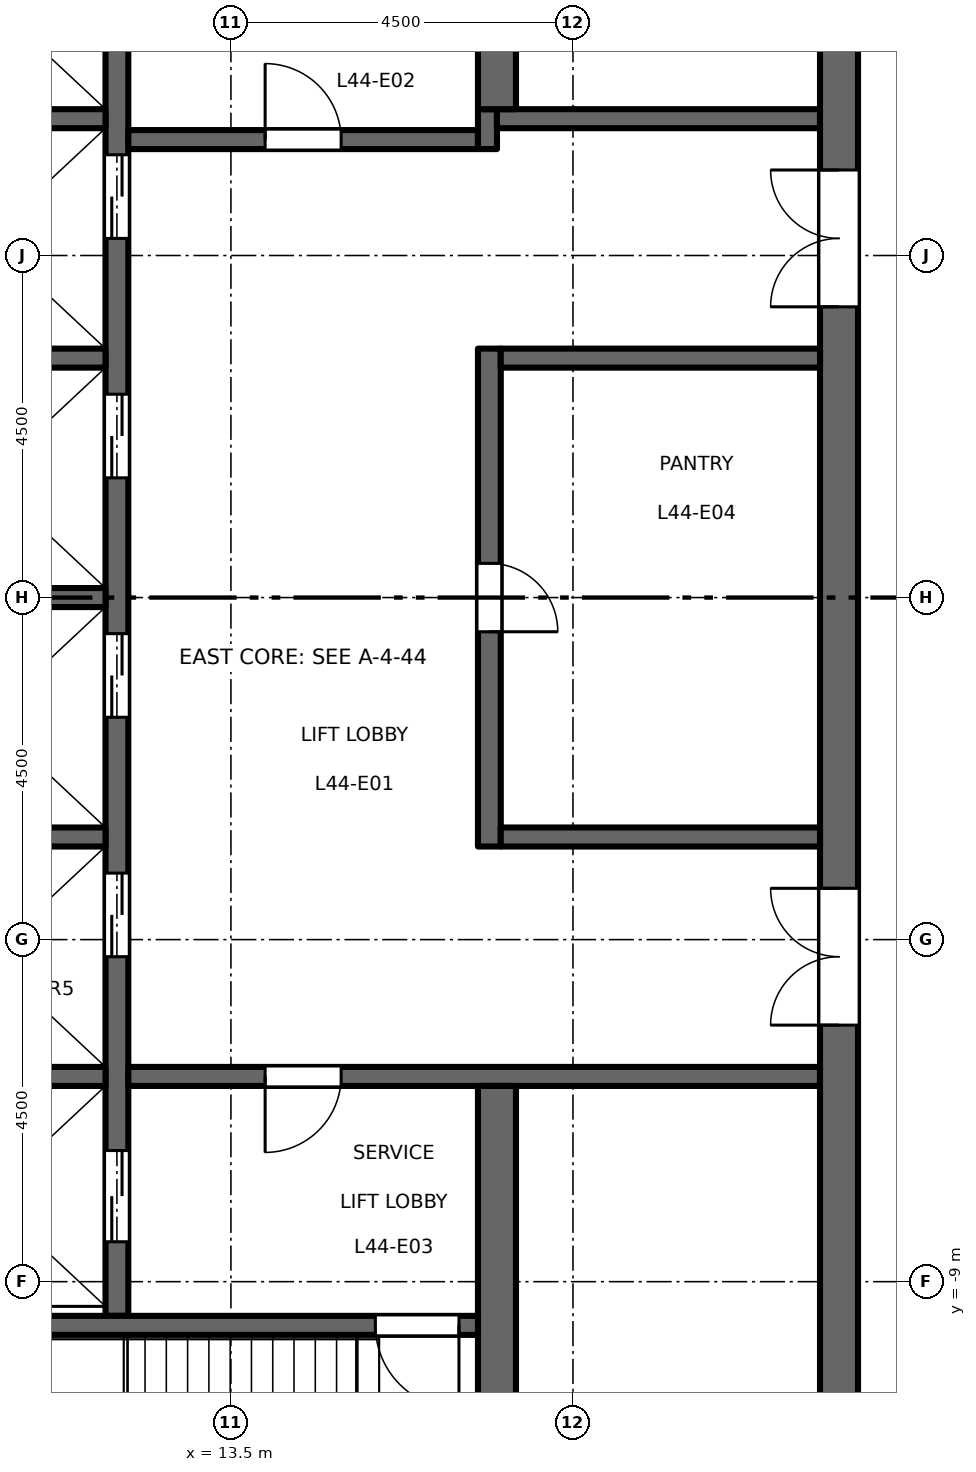
"""IFC4 building model, lengths in metres.
Left out: names, types, materials, properties, quantities, classifications, styles, units other than length and angle.
Written with IfcOpenShell. Run it as: python <this file> out.ifc"""

import sys

from ifc_helpers import new_model, si_unit, direction, frame, frame_2d, origin, place, context, subcontext, project, spatial, rectangle, extrude, element, fill, save


model = new_model("IFC4")
c1 = context("Model", 3, precision=1e-05, world=origin(), true_north=direction((0.0, 1.0)))
c2 = subcontext(c1, "Body", "Model", "MODEL_VIEW")
j1 = project(units=[si_unit("LENGTHUNIT", "METRE"), si_unit("PLANEANGLEUNIT", "RADIAN")], contexts=[c1])
p1 = place(None, origin())
s1 = spatial("IfcSite", under=j1, at=p1, CompositionType="ELEMENT")
p2 = place(p1, origin())
s2 = spatial("IfcBuilding", under=s1, at=p2, CompositionType="ELEMENT")
p3 = place(p2, frame((0.0, 0.0, 206.2)))
s3 = spatial("IfcBuildingStorey", under=s2, at=p3, CompositionType="ELEMENT", Elevation=206.2)
p4 = place(p3, frame((12.0, -9.45, 0.0), z_axis=(0.0, 0.0, 1.0), x_axis=(0.0, 1.0, 0.0)))
e1 = element("IfcWall", 1, at=p4, inside=s3, PredefinedType="SHEAR", context=c2, shape_type="SweptSolid", body=[
    extrude(rectangle(XDim=18.9, YDim=0.3, at=frame_2d((9.45, 0.0))), origin(), (0.0, 0.0, 1.0), 4.35),
])
p5 = place(p4, frame((4.725, 0.0, 0.0)))
e2 = element("IfcOpeningElement", 2, at=p5, cuts=e1, PredefinedType="OPENING", context=c2, shape_type="SweptSolid", body=[
    extrude(rectangle(XDim=1.1, YDim=2.1, at=frame_2d((0.55, 1.05))), frame((0.0, 0.16, 0.0), z_axis=(0.0, -1.0, 0.0), x_axis=(1.0, 0.0, 0.0)), (0.0, 0.0, 1.0), 0.32),
])
p6 = place(p4, frame((7.875, 0.0, 0.0)))
e3 = element("IfcOpeningElement", 3, at=p6, cuts=e1, PredefinedType="OPENING", context=c2, shape_type="SweptSolid", body=[
    extrude(rectangle(XDim=1.1, YDim=2.1, at=frame_2d((0.55, 1.05))), frame((0.0, 0.16, 0.0), z_axis=(0.0, -1.0, 0.0), x_axis=(1.0, 0.0, 0.0)), (0.0, 0.0, 1.0), 0.32),
])
p7 = place(p4, frame((11.025, 0.0, 0.0)))
e4 = element("IfcOpeningElement", 4, at=p7, cuts=e1, PredefinedType="OPENING", context=c2, shape_type="SweptSolid", body=[
    extrude(rectangle(XDim=1.1, YDim=2.1, at=frame_2d((0.55, 1.05))), frame((0.0, 0.16, 0.0), z_axis=(0.0, -1.0, 0.0), x_axis=(1.0, 0.0, 0.0)), (0.0, 0.0, 1.0), 0.32),
])
p8 = place(p4, frame((14.175, 0.0, 0.0)))
e5 = element("IfcOpeningElement", 5, at=p8, cuts=e1, PredefinedType="OPENING", context=c2, shape_type="SweptSolid", body=[
    extrude(rectangle(XDim=1.1, YDim=2.1, at=frame_2d((0.55, 1.05))), frame((0.0, 0.16, 0.0), z_axis=(0.0, -1.0, 0.0), x_axis=(1.0, 0.0, 0.0)), (0.0, 0.0, 1.0), 0.32),
])
p9 = place(p4, frame((16.725, 0.0, 0.0)))
e6 = element("IfcOpeningElement", 6, at=p9, cuts=e1, PredefinedType="OPENING", context=c2, shape_type="SweptSolid", body=[
    extrude(rectangle(XDim=1.2, YDim=2.1, at=frame_2d((0.6, 1.05))), frame((0.0, 0.16, 0.0), z_axis=(0.0, -1.0, 0.0), x_axis=(1.0, 0.0, 0.0)), (0.0, 0.0, 1.0), 0.32),
])
p10 = place(p4, frame((0.975, 0.0, 0.0)))
e7 = element("IfcOpeningElement", 7, at=p10, cuts=e1, PredefinedType="OPENING", context=c2, shape_type="SweptSolid", body=[
    extrude(rectangle(XDim=1.2, YDim=2.1, at=frame_2d((0.6, 1.05))), frame((0.0, 0.16, 0.0), z_axis=(0.0, -1.0, 0.0), x_axis=(1.0, 0.0, 0.0)), (0.0, 0.0, 1.0), 0.32),
])
p11 = place(p3, frame((12.15, 6.025, 0.0), z_axis=(0.0, 0.0, 1.0), x_axis=(1.0, 0.0, 0.0)))
e8 = element("IfcWall", 8, at=p11, inside=s3, PredefinedType="SHEAR", context=c2, shape_type="SweptSolid", body=[
    extrude(rectangle(XDim=4.6, YDim=0.25, at=frame_2d((2.3, 0.0))), origin(), (0.0, 0.0, 1.0), 4.35),
])
p12 = place(p11, frame((1.8, 0.0, 0.0)))
e9 = element("IfcOpeningElement", 9, at=p12, cuts=e8, PredefinedType="OPENING", context=c2, shape_type="SweptSolid", body=[
    extrude(rectangle(XDim=1.0, YDim=2.1, at=frame_2d((0.5, 1.05))), frame((0.0, 0.135, 0.0), z_axis=(0.0, -1.0, 0.0), x_axis=(1.0, 0.0, 0.0)), (0.0, 0.0, 1.0), 0.27),
])
p13 = place(p3, frame((16.875, 5.9, 0.0), z_axis=(0.0, 0.0, 1.0), x_axis=(0.0, 1.0, 0.0)))
e10 = element("IfcWall", 10, at=p13, inside=s3, PredefinedType="SHEAR", context=c2, shape_type="SweptSolid", body=[
    extrude(rectangle(XDim=0.525, YDim=0.25, at=frame_2d((0.263, 0.0))), origin(), (0.0, 0.0, 1.0), 4.35),
])
p14 = place(p3, frame((17.0, 6.3, 0.0), z_axis=(0.0, 0.0, 1.0), x_axis=(1.0, 0.0, 0.0)))
e11 = element("IfcWall", 11, at=p14, inside=s3, PredefinedType="SHEAR", context=c2, shape_type="SweptSolid", body=[
    extrude(rectangle(XDim=4.25, YDim=0.25, at=frame_2d((2.125, 0.0))), origin(), (0.0, 0.0, 1.0), 4.35),
])
p15 = place(p3, frame((12.15, -6.3, 0.0), z_axis=(0.0, 0.0, 1.0), x_axis=(1.0, 0.0, 0.0)))
e12 = element("IfcWall", 12, at=p15, inside=s3, PredefinedType="SHEAR", context=c2, shape_type="SweptSolid", body=[
    extrude(rectangle(XDim=9.1, YDim=0.25, at=frame_2d((4.55, 0.0))), origin(), (0.0, 0.0, 1.0), 4.35),
])
p16 = place(p15, frame((1.8, 0.0, 0.0)))
e13 = element("IfcOpeningElement", 13, at=p16, cuts=e12, PredefinedType="OPENING", context=c2, shape_type="SweptSolid", body=[
    extrude(rectangle(XDim=1.0, YDim=2.1, at=frame_2d((0.5, 1.05))), frame((0.0, 0.135, 0.0), z_axis=(0.0, -1.0, 0.0), x_axis=(1.0, 0.0, 0.0)), (0.0, 0.0, 1.0), 0.27),
])
p17 = place(p3, frame((21.5, -13.0, 0.0), z_axis=(0.0, 0.0, 1.0), x_axis=(0.0, 1.0, 0.0)))
e14 = element("IfcWall", 14, at=p17, inside=s3, PredefinedType="SHEAR", context=c2, shape_type="SweptSolid", body=[
    extrude(rectangle(XDim=26.0, YDim=0.5, at=frame_2d((13.0, 0.0))), origin(), (0.0, 0.0, 1.0), 4.35),
])
p18 = place(p17, frame((16.825, 0.0, 0.0)))
e15 = element("IfcOpeningElement", 15, at=p18, cuts=e14, PredefinedType="OPENING", context=c2, shape_type="SweptSolid", body=[
    extrude(rectangle(XDim=1.8, YDim=2.1, at=frame_2d((0.9, 1.05))), frame((0.0, 0.26, 0.0), z_axis=(0.0, -1.0, 0.0), x_axis=(1.0, 0.0, 0.0)), (0.0, 0.0, 1.0), 0.52),
])
p19 = place(p17, frame((7.375, 0.0, 0.0)))
e16 = element("IfcOpeningElement", 16, at=p19, cuts=e14, PredefinedType="OPENING", context=c2, shape_type="SweptSolid", body=[
    extrude(rectangle(XDim=1.8, YDim=2.1, at=frame_2d((0.9, 1.05))), frame((0.0, 0.26, 0.0), z_axis=(0.0, -1.0, 0.0), x_axis=(1.0, 0.0, 0.0)), (0.0, 0.0, 1.0), 0.52),
])
p20 = place(p3, frame((16.9, -3.275, 0.0), z_axis=(0.0, 0.0, 1.0), x_axis=(0.0, 1.0, 0.0)))
e17 = element("IfcWall", 17, at=p20, inside=s3, PredefinedType="SHEAR", context=c2, shape_type="SweptSolid", body=[
    extrude(rectangle(XDim=6.55, YDim=0.3, at=frame_2d((3.275, 0.0))), origin(), (0.0, 0.0, 1.0), 4.35),
])
p21 = place(p20, frame((2.825, 0.0, 0.0)))
e18 = element("IfcOpeningElement", 18, at=p21, cuts=e17, PredefinedType="OPENING", context=c2, shape_type="SweptSolid", body=[
    extrude(rectangle(XDim=0.9, YDim=2.1, at=frame_2d((0.45, 1.05))), frame((0.0, 0.16, 0.0), z_axis=(0.0, -1.0, 0.0), x_axis=(1.0, 0.0, 0.0)), (0.0, 0.0, 1.0), 0.32),
])
for number, where, z_axis, x_axis in (
    (19, (17.05, 3.15, 0.0), (0.0, 0.0, 1.0), (1.0, 0.0, 0.0)),
    (20, (17.05, -3.15, 0.0), (0.0, 0.0, 1.0), (1.0, 0.0, 0.0)),
):
    element("IfcWall", number, at=place(p3, frame(where, z_axis=z_axis, x_axis=x_axis)), inside=s3, PredefinedType="SHEAR", context=c2, shape_type="SweptSolid", body=[
        extrude(rectangle(XDim=4.2, YDim=0.25, at=frame_2d((2.1, 0.0))), origin(), (0.0, 0.0, 1.0), 4.35),
    ])
for number, where, z_axis, x_axis in (
    (21, (17.0, 6.425, 0.0), (0.0, 0.0, 1.0), (0.0, 1.0, 0.0)),
    (22, (17.0, -13.0, 0.0), (0.0, 0.0, 1.0), (0.0, 1.0, 0.0)),
):
    element("IfcWall", number, at=place(p3, frame(where, z_axis=z_axis, x_axis=x_axis)), inside=s3, PredefinedType="SHEAR", context=c2, shape_type="SweptSolid", body=[
        extrude(rectangle(XDim=6.575, YDim=0.5, at=frame_2d((3.288, 0.0))), origin(), (0.0, 0.0, 1.0), 4.35),
    ])
for number, where, z_axis, x_axis in (
    (23, (8.75, 0.0, 0.0), (0.0, 0.0, 1.0), (1.0, 0.0, 0.0)),
    (24, (8.75, 3.15, 0.0), (0.0, 0.0, 1.0), (1.0, 0.0, 0.0)),
    (25, (8.75, 6.3, 0.0), (0.0, 0.0, 1.0), (1.0, 0.0, 0.0)),
    (26, (8.75, -3.15, 0.0), (0.0, 0.0, 1.0), (1.0, 0.0, 0.0)),
    (27, (8.75, -6.3, 0.0), (0.0, 0.0, 1.0), (1.0, 0.0, 0.0)),
):
    element("IfcWall", number, at=place(p3, frame(where, z_axis=z_axis, x_axis=x_axis)), inside=s3, PredefinedType="SHEAR", context=c2, shape_type="SweptSolid", body=[
        extrude(rectangle(XDim=3.1, YDim=0.25, at=frame_2d((1.55, 0.0))), origin(), (0.0, 0.0, 1.0), 4.35),
    ])
p22 = place(p3, frame((8.75, -9.575, 0.0), z_axis=(0.0, 0.0, 1.0), x_axis=(1.0, 0.0, 0.0)))
e28 = element("IfcWall", 28, at=p22, inside=s3, PredefinedType="SHEAR", context=c2, shape_type="SweptSolid", body=[
    extrude(rectangle(XDim=8.0, YDim=0.25, at=frame_2d((4.0, 0.0))), origin(), (0.0, 0.0, 1.0), 4.35),
])
p23 = place(p22, frame((6.65, 0.0, 0.0)))
e29 = element("IfcOpeningElement", 29, at=p23, cuts=e28, PredefinedType="OPENING", context=c2, shape_type="SweptSolid", body=[
    extrude(rectangle(XDim=1.1, YDim=2.1, at=frame_2d((0.55, 1.05))), frame((0.0, 0.135, 0.0), z_axis=(0.0, -1.0, 0.0), x_axis=(1.0, 0.0, 0.0)), (0.0, 0.0, 1.0), 0.27),
])
p24 = place(p12, origin())
e30 = element("IfcDoor", 30, at=p24, inside=s3, OperationType="SINGLE_SWING_RIGHT", PredefinedType="DOOR", context=c2, shape_type="SweptSolid", body=[
    extrude(rectangle(XDim=1.0, YDim=2.1, at=frame_2d((0.5, 1.05))), frame((0.0, 0.025, 0.0), z_axis=(0.0, -1.0, 0.0), x_axis=(1.0, 0.0, 0.0)), (0.0, 0.0, 1.0), 0.05),
])
fill(e9, e30)
p25 = place(p16, origin())
e31 = element("IfcDoor", 31, at=p25, inside=s3, OperationType="SINGLE_SWING_LEFT", PredefinedType="DOOR", context=c2, shape_type="SweptSolid", body=[
    extrude(rectangle(XDim=1.0, YDim=2.1, at=frame_2d((0.5, 1.05))), frame((0.0, 0.025, 0.0), z_axis=(0.0, -1.0, 0.0), x_axis=(1.0, 0.0, 0.0)), (0.0, 0.0, 1.0), 0.05),
])
fill(e13, e31)
p26 = place(p23, origin())
e32 = element("IfcDoor", 32, at=p26, inside=s3, OperationType="SINGLE_SWING_RIGHT", PredefinedType="DOOR", context=c2, shape_type="SweptSolid", body=[
    extrude(rectangle(XDim=1.1, YDim=2.1, at=frame_2d((0.55, 1.05))), frame((0.0, 0.025, 0.0), z_axis=(0.0, -1.0, 0.0), x_axis=(1.0, 0.0, 0.0)), (0.0, 0.0, 1.0), 0.05),
])
fill(e29, e32)
p27 = place(p18, origin())
e33 = element("IfcDoor", 33, at=p27, inside=s3, OperationType="DOUBLE_DOOR_DOUBLE_SWING", PredefinedType="DOOR", context=c2, shape_type="SweptSolid", body=[
    extrude(rectangle(XDim=1.8, YDim=2.1, at=frame_2d((0.9, 1.05))), frame((0.0, 0.025, 0.0), z_axis=(0.0, -1.0, 0.0), x_axis=(1.0, 0.0, 0.0)), (0.0, 0.0, 1.0), 0.05),
])
fill(e15, e33)
p28 = place(p19, origin())
e34 = element("IfcDoor", 34, at=p28, inside=s3, OperationType="DOUBLE_DOOR_DOUBLE_SWING", PredefinedType="DOOR", context=c2, shape_type="SweptSolid", body=[
    extrude(rectangle(XDim=1.8, YDim=2.1, at=frame_2d((0.9, 1.05))), frame((0.0, 0.025, 0.0), z_axis=(0.0, -1.0, 0.0), x_axis=(1.0, 0.0, 0.0)), (0.0, 0.0, 1.0), 0.05),
])
fill(e16, e34)
p29 = place(p5, origin())
e35 = element("IfcDoor", 35, at=p29, inside=s3, OperationType="DOUBLE_DOOR_SLIDING", PredefinedType="DOOR", context=c2, shape_type="SweptSolid", body=[
    extrude(rectangle(XDim=1.1, YDim=2.1, at=frame_2d((0.55, 1.05))), frame((0.0, 0.025, 0.0), z_axis=(0.0, -1.0, 0.0), x_axis=(1.0, 0.0, 0.0)), (0.0, 0.0, 1.0), 0.05),
])
fill(e2, e35)
p30 = place(p6, origin())
e36 = element("IfcDoor", 36, at=p30, inside=s3, OperationType="DOUBLE_DOOR_SLIDING", PredefinedType="DOOR", context=c2, shape_type="SweptSolid", body=[
    extrude(rectangle(XDim=1.1, YDim=2.1, at=frame_2d((0.55, 1.05))), frame((0.0, 0.025, 0.0), z_axis=(0.0, -1.0, 0.0), x_axis=(1.0, 0.0, 0.0)), (0.0, 0.0, 1.0), 0.05),
])
fill(e3, e36)
p31 = place(p7, origin())
e37 = element("IfcDoor", 37, at=p31, inside=s3, OperationType="DOUBLE_DOOR_SLIDING", PredefinedType="DOOR", context=c2, shape_type="SweptSolid", body=[
    extrude(rectangle(XDim=1.1, YDim=2.1, at=frame_2d((0.55, 1.05))), frame((0.0, 0.025, 0.0), z_axis=(0.0, -1.0, 0.0), x_axis=(1.0, 0.0, 0.0)), (0.0, 0.0, 1.0), 0.05),
])
fill(e4, e37)
p32 = place(p8, origin())
e38 = element("IfcDoor", 38, at=p32, inside=s3, OperationType="DOUBLE_DOOR_SLIDING", PredefinedType="DOOR", context=c2, shape_type="SweptSolid", body=[
    extrude(rectangle(XDim=1.1, YDim=2.1, at=frame_2d((0.55, 1.05))), frame((0.0, 0.025, 0.0), z_axis=(0.0, -1.0, 0.0), x_axis=(1.0, 0.0, 0.0)), (0.0, 0.0, 1.0), 0.05),
])
fill(e5, e38)
p33 = place(p10, origin())
e39 = element("IfcDoor", 39, at=p33, inside=s3, OperationType="DOUBLE_DOOR_SLIDING", PredefinedType="DOOR", context=c2, shape_type="SweptSolid", body=[
    extrude(rectangle(XDim=1.2, YDim=2.1, at=frame_2d((0.6, 1.05))), frame((0.0, 0.025, 0.0), z_axis=(0.0, -1.0, 0.0), x_axis=(1.0, 0.0, 0.0)), (0.0, 0.0, 1.0), 0.05),
])
fill(e7, e39)
p34 = place(p21, origin())
e40 = element("IfcDoor", 40, at=p34, inside=s3, OperationType="SINGLE_SWING_LEFT", PredefinedType="DOOR", context=c2, shape_type="SweptSolid", body=[
    extrude(rectangle(XDim=0.9, YDim=2.1, at=frame_2d((0.45, 1.05))), frame((0.0, 0.025, 0.0), z_axis=(0.0, -1.0, 0.0), x_axis=(1.0, 0.0, 0.0)), (0.0, 0.0, 1.0), 0.05),
])
fill(e18, e40)
save(model, sys.argv[1])
